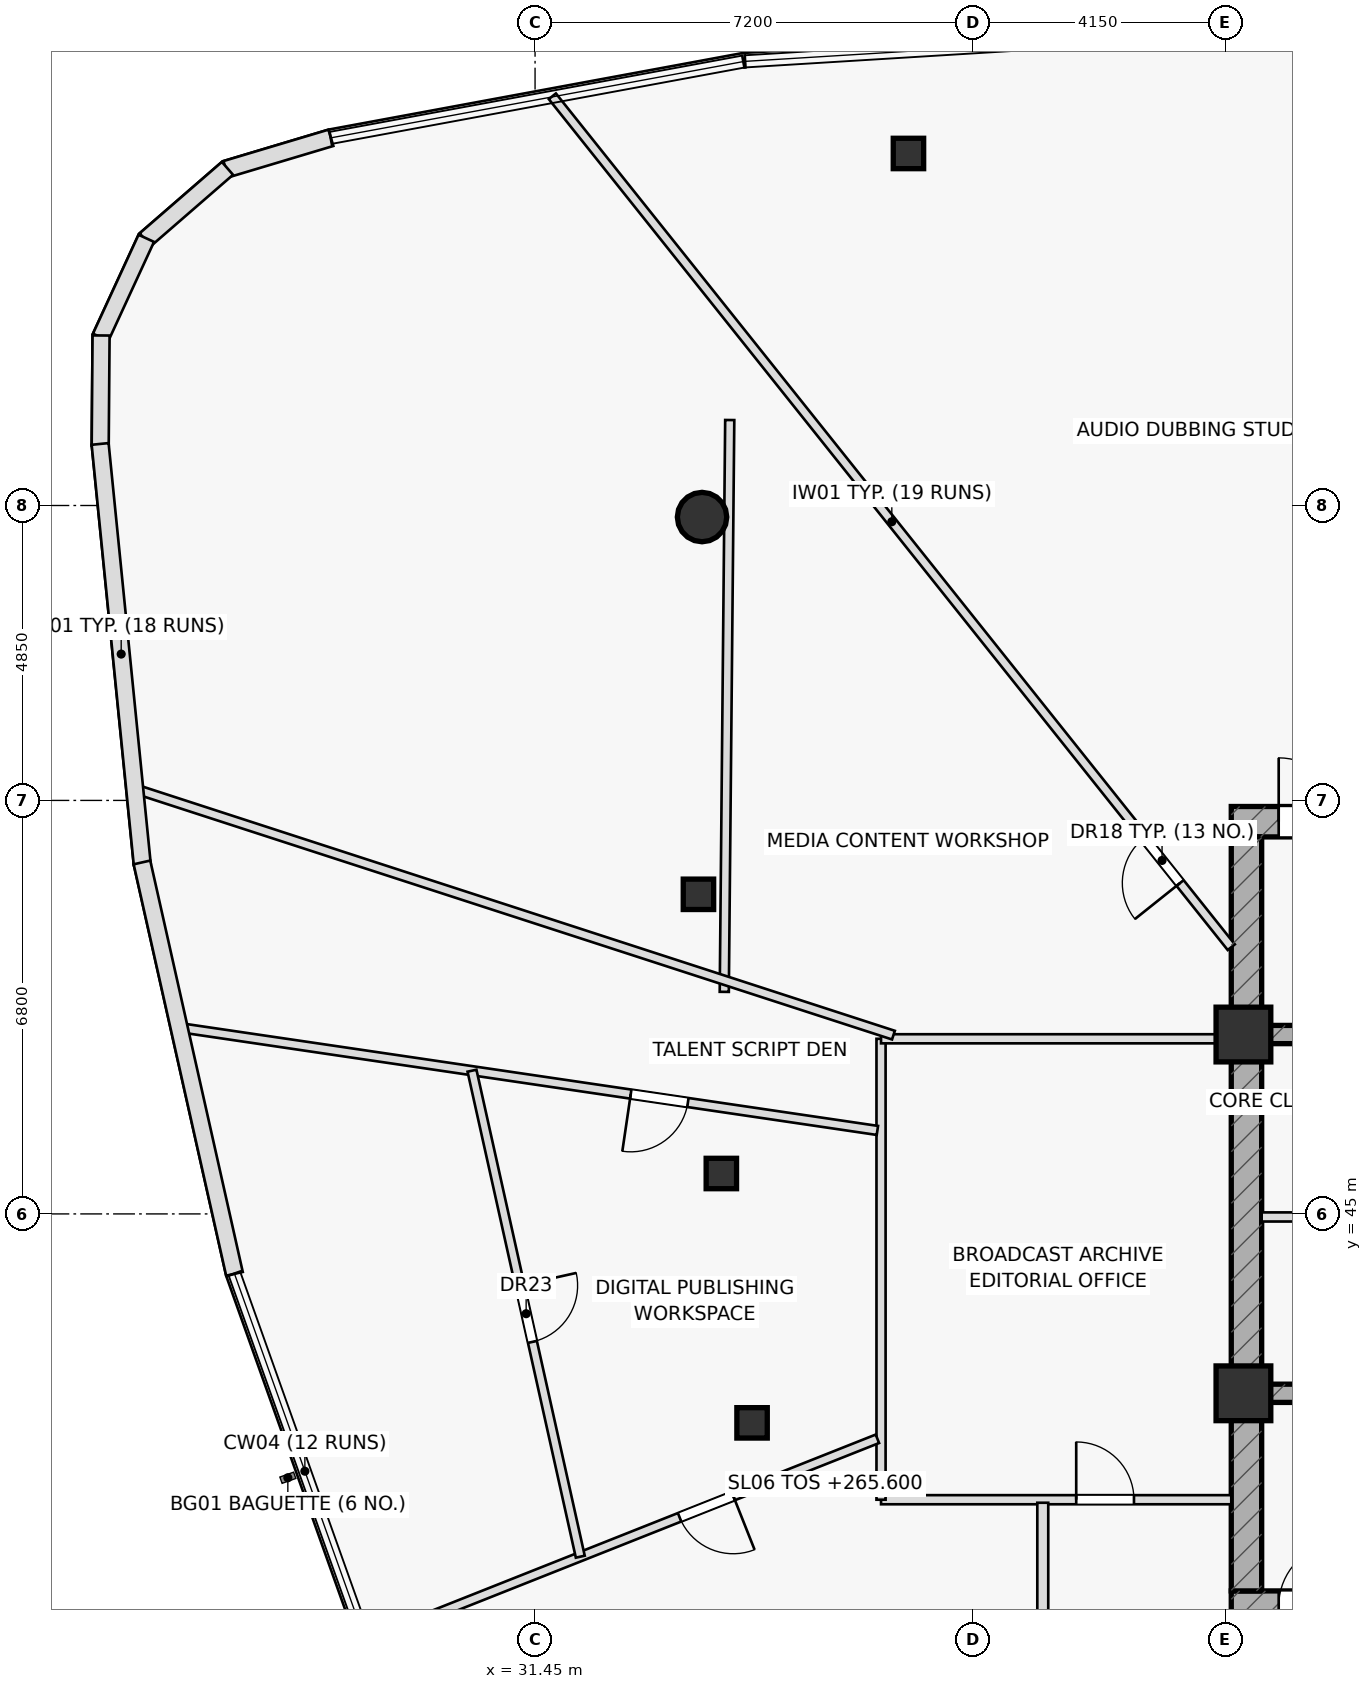
"""IFC4 building model, lengths in metres.
Left out: names, types, materials, properties, quantities, classifications, styles, units other than length and angle.
Written with IfcOpenShell. Run it as: python <this file> out.ifc"""

import sys

from ifc_helpers import new_model, si_unit, direction, frame, frame_2d, origin, origin_2d, place, context, subcontext, project, spatial, rectangle, hollow_rectangle, hollow_circle, extrude, element, fill, save


model = new_model("IFC4")
c1 = context("Model", 3, precision=1e-05, world=origin(), true_north=direction((0.0, 1.0)))
c2 = subcontext(c1, "Body", "Model", "MODEL_VIEW")
j1 = project(units=[si_unit("LENGTHUNIT", "METRE"), si_unit("PLANEANGLEUNIT", "RADIAN")], contexts=[c1])
p1 = place(None, origin())
s1 = spatial("IfcSite", under=j1, at=p1, CompositionType="ELEMENT")
p2 = place(p1, origin())
s2 = spatial("IfcBuilding", under=s1, at=p2, CompositionType="ELEMENT")
p3 = place(p2, frame((0.0, 0.0, 265.6)))
s3 = spatial("IfcBuildingStorey", under=s2, at=p3, CompositionType="ELEMENT", Elevation=265.6)
p4 = place(p3, frame((42.9, 51.45, 0.0), z_axis=(0.0, 0.0, 1.0), x_axis=(1.0, 0.0, 0.0)))
e1 = element("IfcWall", 1, at=p4, inside=s3, PredefinedType="SHEAR", context=c2, shape_type="SweptSolid", body=[
    extrude(rectangle(XDim=14.2, YDim=0.5, at=frame_2d((7.1, 0.0))), origin(), (0.0, 0.0, 1.0), 3.65),
])
p5 = place(p4, frame((0.78, 0.0, 0.0)))
e2 = element("IfcOpeningElement", 2, at=p5, cuts=e1, PredefinedType="OPENING", context=c2, shape_type="SweptSolid", body=[
    extrude(rectangle(XDim=1.05, YDim=2.2, at=frame_2d((0.525, 1.1))), frame((0.0, 0.26, 0.0), z_axis=(0.0, -1.0, 0.0), x_axis=(1.0, 0.0, 0.0)), (0.0, 0.0, 1.0), 0.52),
])
p6 = place(p3, frame((42.9, 38.55, 0.0), z_axis=(0.0, 0.0, 1.0), x_axis=(1.0, 0.0, 0.0)))
e3 = element("IfcWall", 3, at=p6, inside=s3, PredefinedType="SHEAR", context=c2, shape_type="SweptSolid", body=[
    extrude(rectangle(XDim=14.2, YDim=0.5, at=frame_2d((7.1, 0.0))), origin(), (0.0, 0.0, 1.0), 3.65),
])
p7 = place(p6, frame((0.78, 0.0, 0.0)))
e4 = element("IfcOpeningElement", 4, at=p7, cuts=e3, PredefinedType="OPENING", context=c2, shape_type="SweptSolid", body=[
    extrude(rectangle(XDim=1.05, YDim=2.2, at=frame_2d((0.525, 1.1))), frame((0.0, 0.26, 0.0), z_axis=(0.0, -1.0, 0.0), x_axis=(1.0, 0.0, 0.0)), (0.0, 0.0, 1.0), 0.52),
])
p8 = place(p3, frame((43.15, 38.8, 0.0), z_axis=(0.0, 0.0, 1.0), x_axis=(0.0, 1.0, 0.0)))
e5 = element("IfcWall", 5, at=p8, inside=s3, PredefinedType="SHEAR", context=c2, shape_type="SweptSolid", body=[
    extrude(rectangle(XDim=12.4, YDim=0.5, at=frame_2d((6.2, 0.0))), origin(), (0.0, 0.0, 1.0), 3.65),
])
p9 = place(p3, frame((43.4, 47.95, 0.0), z_axis=(0.0, 0.0, 1.0), x_axis=(1.0, 0.0, 0.0)))
e6 = element("IfcWall", 6, at=p9, inside=s3, PredefinedType="SHEAR", context=c2, shape_type="SweptSolid", body=[
    extrude(rectangle(XDim=13.2, YDim=0.3, at=frame_2d((6.6, 0.0))), origin(), (0.0, 0.0, 1.0), 3.65),
])
p10 = place(p9, frame((8.345, 0.0, 0.0)))
e7 = element("IfcOpeningElement", 7, at=p10, cuts=e6, PredefinedType="OPENING", context=c2, shape_type="SweptSolid", body=[
    extrude(rectangle(XDim=1.15, YDim=2.2, at=frame_2d((0.575, 1.1))), frame((0.0, 0.16, 0.0), z_axis=(0.0, -1.0, 0.0), x_axis=(1.0, 0.0, 0.0)), (0.0, 0.0, 1.0), 0.32),
])
p11 = place(p9, frame((10.065, 0.0, 0.0)))
e8 = element("IfcOpeningElement", 8, at=p11, cuts=e6, PredefinedType="OPENING", context=c2, shape_type="SweptSolid", body=[
    extrude(rectangle(XDim=1.15, YDim=2.2, at=frame_2d((0.575, 1.1))), frame((0.0, 0.16, 0.0), z_axis=(0.0, -1.0, 0.0), x_axis=(1.0, 0.0, 0.0)), (0.0, 0.0, 1.0), 0.32),
])
p12 = place(p9, frame((11.645, 0.0, 0.0)))
e9 = element("IfcOpeningElement", 9, at=p12, cuts=e6, PredefinedType="OPENING", context=c2, shape_type="SweptSolid", body=[
    extrude(rectangle(XDim=1.15, YDim=2.2, at=frame_2d((0.575, 1.1))), frame((0.0, 0.16, 0.0), z_axis=(0.0, -1.0, 0.0), x_axis=(1.0, 0.0, 0.0)), (0.0, 0.0, 1.0), 0.32),
])
p13 = place(p3, frame((43.4, 42.05, 0.0), z_axis=(0.0, 0.0, 1.0), x_axis=(1.0, 0.0, 0.0)))
e10 = element("IfcWall", 10, at=p13, inside=s3, PredefinedType="SHEAR", context=c2, shape_type="SweptSolid", body=[
    extrude(rectangle(XDim=13.2, YDim=0.3, at=frame_2d((6.6, 0.0))), origin(), (0.0, 0.0, 1.0), 3.65),
])
p14 = place(p13, frame((9.1, 0.0, 0.0)))
e11 = element("IfcOpeningElement", 11, at=p14, cuts=e10, PredefinedType="OPENING", context=c2, shape_type="SweptSolid", body=[
    extrude(rectangle(XDim=1.5, YDim=2.2, at=frame_2d((0.75, 1.1))), frame((0.0, 0.16, 0.0), z_axis=(0.0, -1.0, 0.0), x_axis=(1.0, 0.0, 0.0)), (0.0, 0.0, 1.0), 0.32),
])
for number, where, z_axis, x_axis in (
    (12, (43.1, 47.95, 0.0), (0.0, 0.0, 1.0), (1.0, 0.0, 0.0)),
    (13, (43.1, 42.05, 0.0), (0.0, 0.0, 1.0), (1.0, 0.0, 0.0)),
):
    element("IfcColumn", number, at=place(p3, frame(where, z_axis=z_axis, x_axis=x_axis)), inside=s3, PredefinedType="COLUMN", context=c2, shape_type="SweptSolid", body=[
        extrude(rectangle(XDim=0.9, YDim=0.9, at=origin_2d()), origin(), (0.0, 0.0, 1.0), 3.65),
    ])
p15 = place(p3, frame((34.196, 56.46, 0.0), z_axis=(0.0, 0.0, 1.0), x_axis=(1.0, 0.0, 0.0)))
e14 = element("IfcColumn", 14, at=p15, inside=s3, PredefinedType="COLUMN", context=c2, shape_type="SweptSolid", body=[
    extrude(hollow_circle(Radius=0.406, WallThickness=0.036, at=origin_2d()), origin(), (0.0, 0.0, 1.0), 3.65),
])
for number, where, z_axis, x_axis in (
    (15, (34.137, 50.256, 0.0), (0.0, 0.0, 1.0), (1.0, 0.0, 0.0)),
    (16, (34.514, 45.665, 0.0), (0.0, 0.0, 1.0), (1.0, 0.0, 0.0)),
    (17, (35.019, 41.564, 0.0), (0.0, 0.0, 1.0), (1.0, 0.0, 0.0)),
    (18, (37.591, 62.439, 0.0), (0.0, 0.0, 1.0), (1.0, 0.0, 0.0)),
):
    element("IfcColumn", number, at=place(p3, frame(where, z_axis=z_axis, x_axis=x_axis)), inside=s3, PredefinedType="COLUMN", context=c2, shape_type="SweptSolid", body=[
        extrude(hollow_rectangle(XDim=0.5, YDim=0.5, WallThickness=0.03, at=origin_2d()), origin(), (0.0, 0.0, 1.0), 3.65),
    ])
p16 = place(p3, frame((43.4, 44.95, 0.0), z_axis=(0.0, 0.0, 1.0), x_axis=(1.0, 0.0, 0.0)))
e19 = element("IfcWall", 19, at=p16, inside=s3, PredefinedType="PARTITIONING", context=c2, shape_type="SweptSolid", body=[
    extrude(rectangle(XDim=2.35, YDim=0.15, at=frame_2d((1.175, 0.0))), origin(), (0.0, 0.0, 1.0), 3.65),
])
p17 = place(p3, frame((34.652, 58.056, 0.0), z_axis=(0.0, 0.0, 1.0), x_axis=(-0.009553538759, -0.999954363907, 0.0)))
e20 = element("IfcWall", 20, at=p17, inside=s3, PredefinedType="PARTITIONING", context=c2, shape_type="SweptSolid", body=[
    extrude(rectangle(XDim=9.404, YDim=0.15, at=frame_2d((4.702, 0.0))), origin(), (0.0, 0.0, 1.0), 3.175),
])
p18 = place(p3, frame((37.14, 40.3, 0.0), z_axis=(0.0, 0.0, 1.0), x_axis=(1.0, 0.0, 0.0)))
e21 = element("IfcWall", 21, at=p18, inside=s3, PredefinedType="PARTITIONING", context=c2, shape_type="SweptSolid", body=[
    extrude(rectangle(XDim=5.76, YDim=0.15, at=frame_2d((2.88, 0.0))), origin(), (0.0, 0.0, 1.0), 3.075),
])
p19 = place(p18, frame((3.21, 0.0, 0.0)))
e22 = element("IfcOpeningElement", 22, at=p19, cuts=e21, PredefinedType="OPENING", context=c2, shape_type="SweptSolid", body=[
    extrude(rectangle(XDim=0.95, YDim=2.05, at=frame_2d((0.475, 1.025))), frame((0.0, 0.085, 0.0), z_axis=(0.0, -1.0, 0.0), x_axis=(1.0, 0.0, 0.0)), (0.0, 0.0, 1.0), 0.17),
])
p20 = place(p3, frame((37.14, 40.3, 0.0), z_axis=(0.0, 0.0, 1.0), x_axis=(0.0, 1.0, 0.0)))
e23 = element("IfcWall", 23, at=p20, inside=s3, PredefinedType="PARTITIONING", context=c2, shape_type="SweptSolid", body=[
    extrude(rectangle(XDim=7.58, YDim=0.15, at=frame_2d((3.79, 0.0))), origin(), (0.0, 0.0, 1.0), 3.65),
])
p21 = place(p3, frame((37.14, 47.88, 0.0), z_axis=(0.0, 0.0, 1.0), x_axis=(1.0, 0.0, 0.0)))
e24 = element("IfcWall", 24, at=p21, inside=s3, PredefinedType="PARTITIONING", context=c2, shape_type="SweptSolid", body=[
    extrude(rectangle(XDim=5.76, YDim=0.15, at=frame_2d((2.88, 0.0))), origin(), (0.0, 0.0, 1.0), 3.075),
])
p22 = place(p3, frame((42.9, 49.386, 0.0), z_axis=(0.0, 0.0, 1.0), x_axis=(-0.623691664513, 0.781670459731, 0.0)))
e25 = element("IfcWall", 25, at=p22, inside=s3, PredefinedType="PARTITIONING", context=c2, shape_type="SweptSolid", body=[
    extrude(rectangle(XDim=17.902, YDim=0.15, at=frame_2d((8.951, 0.0))), origin(), (0.0, 0.0, 1.0), 3.075),
])
p23 = place(p22, frame((1.35, 0.0, 0.0)))
e26 = element("IfcOpeningElement", 26, at=p23, cuts=e25, PredefinedType="OPENING", context=c2, shape_type="SweptSolid", body=[
    extrude(rectangle(XDim=0.95, YDim=2.05, at=frame_2d((0.475, 1.025))), frame((0.0, 0.085, 0.0), z_axis=(0.0, -1.0, 0.0), x_axis=(1.0, 0.0, 0.0)), (0.0, 0.0, 1.0), 0.17),
])
p24 = place(p3, frame((37.344, 47.94, 0.0), z_axis=(0.0, 0.0, 1.0), x_axis=(-0.951128986238, 0.30879386577, 0.0)))
e27 = element("IfcWall", 27, at=p24, inside=s3, PredefinedType="PARTITIONING", context=c2, shape_type="SweptSolid", body=[
    extrude(rectangle(XDim=13.131, YDim=0.15, at=frame_2d((6.565, 0.0))), origin(), (0.0, 0.0, 1.0), 3.175),
])
p25 = place(p3, frame((37.08, 46.373, 0.0), z_axis=(0.0, 0.0, 1.0), x_axis=(-0.989323166156, 0.145738371431, 0.0)))
e28 = element("IfcWall", 28, at=p25, inside=s3, PredefinedType="PARTITIONING", context=c2, shape_type="SweptSolid", body=[
    extrude(rectangle(XDim=11.619, YDim=0.15, at=frame_2d((5.81, 0.0))), origin(), (0.0, 0.0, 1.0), 3.075),
])
p26 = place(p25, frame((3.15, 0.0, 0.0)))
e29 = element("IfcOpeningElement", 29, at=p26, cuts=e28, PredefinedType="OPENING", context=c2, shape_type="SweptSolid", body=[
    extrude(rectangle(XDim=0.95, YDim=2.05, at=frame_2d((0.475, 1.025))), frame((0.0, 0.085, 0.0), z_axis=(0.0, -1.0, 0.0), x_axis=(1.0, 0.0, 0.0)), (0.0, 0.0, 1.0), 0.17),
])
p27 = place(p3, frame((37.08, 41.302, 0.0), z_axis=(0.0, 0.0, 1.0), x_axis=(-0.929502291, -0.368816337797, 0.0)))
e30 = element("IfcWall", 30, at=p27, inside=s3, PredefinedType="PARTITIONING", context=c2, shape_type="SweptSolid", body=[
    extrude(rectangle(XDim=9.063, YDim=0.15, at=frame_2d((4.532, 0.0))), origin(), (0.0, 0.0, 1.0), 3.075),
])
p28 = place(p27, frame((2.55, 0.0, 0.0)))
e31 = element("IfcOpeningElement", 31, at=p28, cuts=e30, PredefinedType="OPENING", context=c2, shape_type="SweptSolid", body=[
    extrude(rectangle(XDim=0.95, YDim=2.05, at=frame_2d((0.475, 1.025))), frame((0.0, 0.085, 0.0), z_axis=(0.0, -1.0, 0.0), x_axis=(1.0, 0.0, 0.0)), (0.0, 0.0, 1.0), 0.17),
])
p29 = place(p3, frame((39.8, 38.45, 0.0), z_axis=(0.0, 0.0, 1.0), x_axis=(-0.709811227193, -0.704391951793, 0.0)))
e32 = element("IfcWall", 32, at=p29, inside=s3, PredefinedType="PARTITIONING", context=c2, shape_type="SweptSolid", body=[
    extrude(rectangle(XDim=10.722, YDim=0.15, at=frame_2d((5.361, 0.0))), origin(), (0.0, 0.0, 1.0), 3.075),
])
p30 = place(p29, frame((1.35, 0.0, 0.0)))
e33 = element("IfcOpeningElement", 33, at=p30, cuts=e32, PredefinedType="OPENING", context=c2, shape_type="SweptSolid", body=[
    extrude(rectangle(XDim=0.95, YDim=2.05, at=frame_2d((0.475, 1.025))), frame((0.0, 0.085, 0.0), z_axis=(0.0, -1.0, 0.0), x_axis=(1.0, 0.0, 0.0)), (0.0, 0.0, 1.0), 0.17),
])
p31 = place(p3, frame((30.413, 47.355, 0.0), z_axis=(0.0, 0.0, 1.0), x_axis=(0.217501820027, -0.976059915315, 0.0)))
e34 = element("IfcWall", 34, at=p31, inside=s3, PredefinedType="PARTITIONING", context=c2, shape_type="SweptSolid", body=[
    extrude(rectangle(XDim=8.188, YDim=0.15, at=frame_2d((4.094, 0.0))), origin(), (0.0, 0.0, 1.0), 3.65),
])
p32 = place(p31, frame((3.619, 0.0, 0.0)))
e35 = element("IfcOpeningElement", 35, at=p32, cuts=e34, PredefinedType="OPENING", context=c2, shape_type="SweptSolid", body=[
    extrude(rectangle(XDim=0.95, YDim=2.05, at=frame_2d((0.475, 1.025))), frame((0.0, 0.085, 0.0), z_axis=(0.0, -1.0, 0.0), x_axis=(1.0, 0.0, 0.0)), (0.0, 0.0, 1.0), 0.17),
])
p33 = place(p3, frame((39.8, 36.17, 0.0), z_axis=(0.0, 0.0, 1.0), x_axis=(0.0, 1.0, 0.0)))
e36 = element("IfcWall", 36, at=p33, inside=s3, PredefinedType="PARTITIONING", context=c2, shape_type="SweptSolid", body=[
    extrude(rectangle(XDim=4.08, YDim=0.18, at=frame_2d((2.04, 0.0))), origin(), (0.0, 0.0, 1.0), 3.355),
])
p34 = place(p3, frame((28.092, 62.697, 0.0), z_axis=(0.0, 0.0, 1.0), x_axis=(-0.95805708226, -0.286577436537, 0.0)))
e37 = element("IfcWall", 37, at=p34, inside=s3, PredefinedType="STANDARD", context=c2, shape_type="SweptSolid", body=[
    extrude(rectangle(XDim=1.803, YDim=0.28, at=frame_2d((0.901, 0.0))), origin(), (0.0, 0.0, 1.0), 3.65),
])
for number, where, z_axis, x_axis in (
    (38, (26.391, 62.194, 0.0), (0.0, 0.0, 1.0), (-0.755, -0.655, 0.0)),
    (39, (25.056, 61.044, 0.0), (0.0, 0.0, 1.0), (-0.419, -0.908, 0.0)),
):
    element("IfcWall", number, at=place(p3, frame(where, z_axis=z_axis, x_axis=x_axis)), inside=s3, PredefinedType="STANDARD", context=c2, shape_type="SweptSolid", body=[
        extrude(rectangle(XDim=1.791, YDim=0.28, at=frame_2d((0.896, 0.0))), origin(), (0.0, 0.0, 1.0), 3.65),
    ])
p35 = place(p3, frame((24.312, 59.446, 0.0), z_axis=(0.0, 0.0, 1.0), x_axis=(-0.007942668139, -0.999968456514, 0.0)))
e40 = element("IfcWall", 40, at=p35, inside=s3, PredefinedType="STANDARD", context=c2, shape_type="SweptSolid", body=[
    extrude(rectangle(XDim=1.813, YDim=0.28, at=frame_2d((0.907, 0.0))), origin(), (0.0, 0.0, 1.0), 3.65),
])
p36 = place(p3, frame((24.297, 57.663, 0.0), z_axis=(0.0, 0.0, 1.0), x_axis=(0.099743821193, -0.995013150734, 0.0)))
e41 = element("IfcWall", 41, at=p36, inside=s3, PredefinedType="STANDARD", context=c2, shape_type="SweptSolid", body=[
    extrude(rectangle(XDim=6.947, YDim=0.28, at=frame_2d((3.473, 0.0))), origin(), (0.0, 0.0, 1.0), 3.65),
])
p37 = place(p3, frame((24.985, 50.78, 0.0), z_axis=(0.0, 0.0, 1.0), x_axis=(0.219404962575, -0.975633877229, 0.0)))
e42 = element("IfcWall", 42, at=p37, inside=s3, PredefinedType="STANDARD", context=c2, shape_type="SweptSolid", body=[
    extrude(rectangle(XDim=6.935, YDim=0.28, at=frame_2d((3.467, 0.0))), origin(), (0.0, 0.0, 1.0), 3.65),
])
p38 = place(p5, origin())
e43 = element("IfcDoor", 43, at=p38, inside=s3, OperationType="SINGLE_SWING_LEFT", PredefinedType="DOOR", context=c2, shape_type="SweptSolid", body=[
    extrude(rectangle(XDim=1.05, YDim=2.2, at=frame_2d((0.525, 1.1))), frame((0.0, 0.025, 0.0), z_axis=(0.0, -1.0, 0.0), x_axis=(1.0, 0.0, 0.0)), (0.0, 0.0, 1.0), 0.05),
])
fill(e2, e43)
p39 = place(p7, origin())
e44 = element("IfcDoor", 44, at=p39, inside=s3, OperationType="SINGLE_SWING_RIGHT", PredefinedType="DOOR", context=c2, shape_type="SweptSolid", body=[
    extrude(rectangle(XDim=1.05, YDim=2.2, at=frame_2d((0.525, 1.1))), frame((0.0, 0.025, 0.0), z_axis=(0.0, -1.0, 0.0), x_axis=(1.0, 0.0, 0.0)), (0.0, 0.0, 1.0), 0.05),
])
fill(e4, e44)
p40 = place(p19, origin())
e45 = element("IfcDoor", 45, at=p40, inside=s3, OperationType="SINGLE_SWING_LEFT", PredefinedType="DOOR", context=c2, shape_type="SweptSolid", body=[
    extrude(rectangle(XDim=0.95, YDim=2.05, at=frame_2d((0.475, 1.025))), frame((0.0, 0.025, 0.0), z_axis=(0.0, -1.0, 0.0), x_axis=(1.0, 0.0, 0.0)), (0.0, 0.0, 1.0), 0.05),
])
fill(e22, e45)
p41 = place(p23, origin())
e46 = element("IfcDoor", 46, at=p41, inside=s3, OperationType="SINGLE_SWING_LEFT", PredefinedType="DOOR", context=c2, shape_type="SweptSolid", body=[
    extrude(rectangle(XDim=0.95, YDim=2.05, at=frame_2d((0.475, 1.025))), frame((0.0, 0.025, 0.0), z_axis=(0.0, -1.0, 0.0), x_axis=(1.0, 0.0, 0.0)), (0.0, 0.0, 1.0), 0.05),
])
fill(e26, e46)
p42 = place(p26, origin())
e47 = element("IfcDoor", 47, at=p42, inside=s3, OperationType="SINGLE_SWING_RIGHT", PredefinedType="DOOR", context=c2, shape_type="SweptSolid", body=[
    extrude(rectangle(XDim=0.95, YDim=2.05, at=frame_2d((0.475, 1.025))), frame((0.0, 0.025, 0.0), z_axis=(0.0, -1.0, 0.0), x_axis=(1.0, 0.0, 0.0)), (0.0, 0.0, 1.0), 0.05),
])
fill(e29, e47)
p43 = place(p28, origin())
e48 = element("IfcDoor", 48, at=p43, inside=s3, OperationType="SINGLE_SWING_LEFT", PredefinedType="DOOR", context=c2, shape_type="SweptSolid", body=[
    extrude(rectangle(XDim=0.95, YDim=2.05, at=frame_2d((0.475, 1.025))), frame((0.0, 0.025, 0.0), z_axis=(0.0, -1.0, 0.0), x_axis=(1.0, 0.0, 0.0)), (0.0, 0.0, 1.0), 0.05),
])
fill(e31, e48)
p44 = place(p32, origin())
e49 = element("IfcDoor", 49, at=p44, inside=s3, OperationType="SINGLE_SWING_LEFT", PredefinedType="DOOR", context=c2, shape_type="SweptSolid", body=[
    extrude(rectangle(XDim=0.95, YDim=2.05, at=frame_2d((0.475, 1.025))), frame((0.0, 0.025, 0.0), z_axis=(0.0, -1.0, 0.0), x_axis=(1.0, 0.0, 0.0)), (0.0, 0.0, 1.0), 0.05),
])
fill(e35, e49)
save(model, sys.argv[1])
